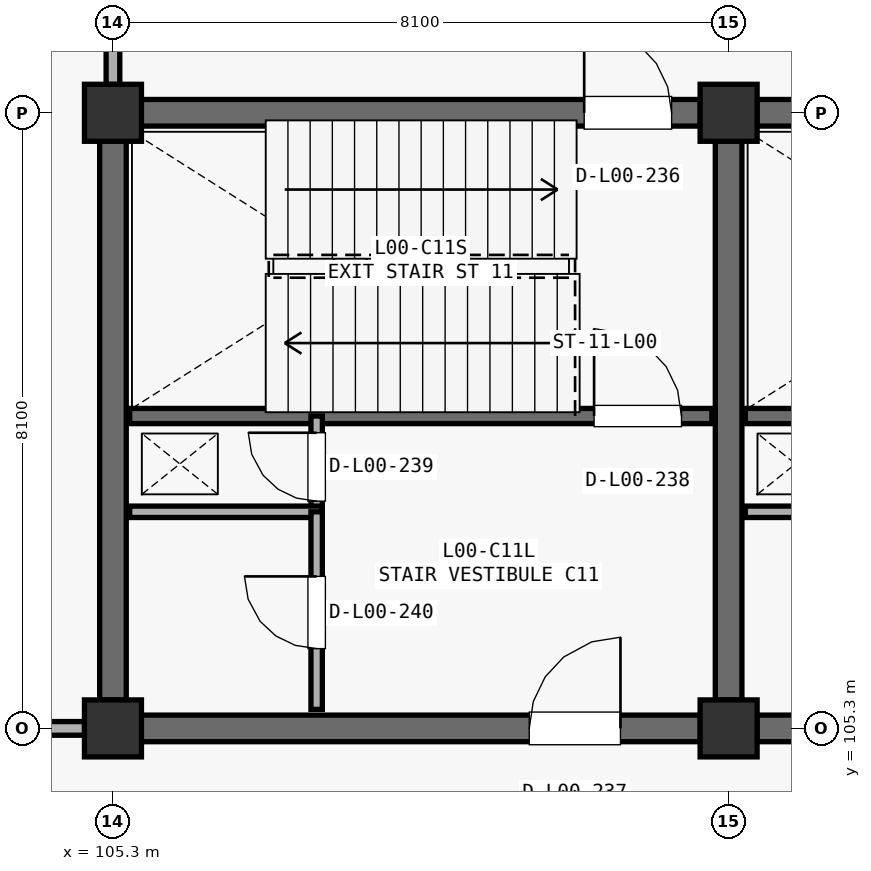
"""IFC4 building model, lengths in metres.
Left out: names, types, materials, properties, quantities, classifications, styles, units other than length and angle.
Written with IfcOpenShell. Run it as: python <this file> out.ifc"""

import sys

from ifc_helpers import new_model, si_unit, direction, frame, frame_2d, origin, origin_2d, place, context, subcontext, project, spatial, rectangle, extrude, element, fill, save


model = new_model("IFC4")
c1 = context("Model", 3, precision=1e-05, world=origin(), true_north=direction((0.0, 1.0)))
c2 = subcontext(c1, "Body", "Model", "MODEL_VIEW")
j1 = project(units=[si_unit("LENGTHUNIT", "METRE"), si_unit("PLANEANGLEUNIT", "RADIAN")], contexts=[c1])
p1 = place(None, origin())
s1 = spatial("IfcSite", under=j1, at=p1, CompositionType="ELEMENT")
p2 = place(p1, origin())
s2 = spatial("IfcBuilding", under=s1, at=p2, CompositionType="ELEMENT")
p3 = place(p2, origin())
s3 = spatial("IfcBuildingStorey", under=s2, at=p3, CompositionType="ELEMENT", Elevation=0.0)
for number, where, z_axis, x_axis in (
    (1, (105.3, 105.3, 0.0), (0.0, 0.0, 1.0), (1.0, 0.0, 0.0)),
    (2, (105.3, 113.4, 0.0), (0.0, 0.0, 1.0), (1.0, 0.0, 0.0)),
    (3, (113.4, 105.3, 0.0), (0.0, 0.0, 1.0), (1.0, 0.0, 0.0)),
    (4, (113.4, 113.4, 0.0), (0.0, 0.0, 1.0), (1.0, 0.0, 0.0)),
):
    element("IfcColumn", number, at=place(p3, frame(where, z_axis=z_axis, x_axis=x_axis)), inside=s3, PredefinedType="COLUMN", context=c2, shape_type="SweptSolid", body=[
        extrude(rectangle(XDim=0.75, YDim=0.75, at=origin_2d()), origin(), (0.0, 0.0, 1.0), 5.1),
    ])
p4 = place(p3, frame((113.773, 113.4, 0.0), z_axis=(0.0, 0.0, 1.0), x_axis=(1.0, 0.0, 0.0)))
e5 = element("IfcWall", 5, at=p4, inside=s3, PredefinedType="SHEAR", context=c2, shape_type="SweptSolid", body=[
    extrude(rectangle(XDim=7.354, YDim=0.35, at=frame_2d((3.677, 0.0))), origin(), (0.0, 0.0, 1.0), 4.822),
])
p5 = place(p4, frame((5.827, 0.0, 0.0)))
e6 = element("IfcOpeningElement", 6, at=p5, cuts=e5, PredefinedType="OPENING", context=c2, shape_type="SweptSolid", body=[
    extrude(rectangle(XDim=1.15, YDim=2.2, at=frame_2d((0.575, 1.1))), frame((0.0, 0.185, 0.0), z_axis=(0.0, -1.0, 0.0), x_axis=(1.0, 0.0, 0.0)), (0.0, 0.0, 1.0), 0.37),
])
p6 = place(p3, frame((113.4, 105.673, 0.0), z_axis=(0.0, 0.0, 1.0), x_axis=(0.0, 1.0, 0.0)))
e7 = element("IfcWall", 7, at=p6, inside=s3, PredefinedType="SHEAR", context=c2, shape_type="SweptSolid", body=[
    extrude(rectangle(XDim=7.354, YDim=0.35, at=frame_2d((3.677, 0.0))), origin(), (0.0, 0.0, 1.0), 4.822),
])
p7 = place(p3, frame((113.773, 105.3, 0.0), z_axis=(0.0, 0.0, 1.0), x_axis=(1.0, 0.0, 0.0)))
e8 = element("IfcWall", 8, at=p7, inside=s3, PredefinedType="SHEAR", context=c2, shape_type="SweptSolid", body=[
    extrude(rectangle(XDim=7.354, YDim=0.35, at=frame_2d((3.677, 0.0))), origin(), (0.0, 0.0, 1.0), 4.822),
])
p8 = place(p7, frame((5.104, 0.0, 0.0)))
e9 = element("IfcOpeningElement", 9, at=p8, cuts=e8, PredefinedType="OPENING", context=c2, shape_type="SweptSolid", body=[
    extrude(rectangle(XDim=1.2, YDim=2.2, at=frame_2d((0.6, 1.1))), frame((0.0, 0.185, 0.0), z_axis=(0.0, -1.0, 0.0), x_axis=(1.0, 0.0, 0.0)), (0.0, 0.0, 1.0), 0.37),
])
p9 = place(p3, frame((113.62, 109.41, 0.0), z_axis=(0.0, 0.0, 1.0), x_axis=(1.0, 0.0, 0.0)))
e10 = element("IfcWall", 10, at=p9, inside=s3, PredefinedType="SHEAR", context=c2, shape_type="SweptSolid", body=[
    extrude(rectangle(XDim=7.66, YDim=0.2, at=frame_2d((3.83, 0.0))), origin(), (0.0, 0.0, 1.0), 4.822),
])
p10 = place(p9, frame((6.11, 0.0, 0.0)))
e11 = element("IfcOpeningElement", 11, at=p10, cuts=e10, PredefinedType="OPENING", context=c2, shape_type="SweptSolid", body=[
    extrude(rectangle(XDim=1.15, YDim=2.2, at=frame_2d((0.575, 1.1))), frame((0.0, 0.11, 0.0), z_axis=(0.0, -1.0, 0.0), x_axis=(1.0, 0.0, 0.0)), (0.0, 0.0, 1.0), 0.22),
])
p11 = place(p3, frame((113.62, 108.15, 0.0), z_axis=(0.0, 0.0, 1.0), x_axis=(1.0, 0.0, 0.0)))
e12 = element("IfcWall", 12, at=p11, inside=s3, PredefinedType="PARTITIONING", context=c2, shape_type="SweptSolid", body=[
    extrude(rectangle(XDim=2.53, YDim=0.15, at=frame_2d((1.265, 0.0))), origin(), (0.0, 0.0, 1.0), 4.822),
])
p12 = place(p3, frame((105.673, 113.4, 0.0), z_axis=(0.0, 0.0, 1.0), x_axis=(1.0, 0.0, 0.0)))
e13 = element("IfcWall", 13, at=p12, inside=s3, PredefinedType="SHEAR", context=c2, shape_type="SweptSolid", body=[
    extrude(rectangle(XDim=7.354, YDim=0.35, at=frame_2d((3.677, 0.0))), origin(), (0.0, 0.0, 1.0), 4.822),
])
p13 = place(p12, frame((5.827, 0.0, 0.0)))
e14 = element("IfcOpeningElement", 14, at=p13, cuts=e13, PredefinedType="OPENING", context=c2, shape_type="SweptSolid", body=[
    extrude(rectangle(XDim=1.15, YDim=2.2, at=frame_2d((0.575, 1.1))), frame((0.0, 0.185, 0.0), z_axis=(0.0, -1.0, 0.0), x_axis=(1.0, 0.0, 0.0)), (0.0, 0.0, 1.0), 0.37),
])
p14 = place(p3, frame((105.3, 105.673, 0.0), z_axis=(0.0, 0.0, 1.0), x_axis=(0.0, 1.0, 0.0)))
e15 = element("IfcWall", 15, at=p14, inside=s3, PredefinedType="SHEAR", context=c2, shape_type="SweptSolid", body=[
    extrude(rectangle(XDim=7.354, YDim=0.35, at=frame_2d((3.677, 0.0))), origin(), (0.0, 0.0, 1.0), 4.822),
])
p15 = place(p3, frame((105.673, 105.3, 0.0), z_axis=(0.0, 0.0, 1.0), x_axis=(1.0, 0.0, 0.0)))
e16 = element("IfcWall", 16, at=p15, inside=s3, PredefinedType="SHEAR", context=c2, shape_type="SweptSolid", body=[
    extrude(rectangle(XDim=7.354, YDim=0.35, at=frame_2d((3.677, 0.0))), origin(), (0.0, 0.0, 1.0), 4.822),
])
p16 = place(p15, frame((5.104, 0.0, 0.0)))
e17 = element("IfcOpeningElement", 17, at=p16, cuts=e16, PredefinedType="OPENING", context=c2, shape_type="SweptSolid", body=[
    extrude(rectangle(XDim=1.2, YDim=2.2, at=frame_2d((0.6, 1.1))), frame((0.0, 0.185, 0.0), z_axis=(0.0, -1.0, 0.0), x_axis=(1.0, 0.0, 0.0)), (0.0, 0.0, 1.0), 0.37),
])
p17 = place(p3, frame((105.52, 109.41, 0.0), z_axis=(0.0, 0.0, 1.0), x_axis=(1.0, 0.0, 0.0)))
e18 = element("IfcWall", 18, at=p17, inside=s3, PredefinedType="SHEAR", context=c2, shape_type="SweptSolid", body=[
    extrude(rectangle(XDim=7.66, YDim=0.2, at=frame_2d((3.83, 0.0))), origin(), (0.0, 0.0, 1.0), 4.822),
])
p18 = place(p17, frame((6.11, 0.0, 0.0)))
e19 = element("IfcOpeningElement", 19, at=p18, cuts=e18, PredefinedType="OPENING", context=c2, shape_type="SweptSolid", body=[
    extrude(rectangle(XDim=1.15, YDim=2.2, at=frame_2d((0.575, 1.1))), frame((0.0, 0.11, 0.0), z_axis=(0.0, -1.0, 0.0), x_axis=(1.0, 0.0, 0.0)), (0.0, 0.0, 1.0), 0.22),
])
p19 = place(p3, frame((107.98, 108.15, 0.0), z_axis=(0.0, 0.0, 1.0), x_axis=(0.0, 1.0, 0.0)))
e20 = element("IfcWall", 20, at=p19, inside=s3, PredefinedType="PARTITIONING", context=c2, shape_type="SweptSolid", body=[
    extrude(rectangle(XDim=1.26, YDim=0.15, at=frame_2d((0.63, 0.0))), origin(), (0.0, 0.0, 1.0), 4.822),
])
p20 = place(p19, frame((0.14, 0.0, 0.0)))
e21 = element("IfcOpeningElement", 21, at=p20, cuts=e20, PredefinedType="OPENING", context=c2, shape_type="SweptSolid", body=[
    extrude(rectangle(XDim=0.9, YDim=2.15, at=frame_2d((0.45, 1.075))), frame((0.0, 0.085, 0.0), z_axis=(0.0, -1.0, 0.0), x_axis=(1.0, 0.0, 0.0)), (0.0, 0.0, 1.0), 0.17),
])
p21 = place(p3, frame((105.52, 108.15, 0.0), z_axis=(0.0, 0.0, 1.0), x_axis=(1.0, 0.0, 0.0)))
e22 = element("IfcWall", 22, at=p21, inside=s3, PredefinedType="PARTITIONING", context=c2, shape_type="SweptSolid", body=[
    extrude(rectangle(XDim=2.53, YDim=0.15, at=frame_2d((1.265, 0.0))), origin(), (0.0, 0.0, 1.0), 4.822),
])
p22 = place(p3, frame((107.98, 105.55, 0.0), z_axis=(0.0, 0.0, 1.0), x_axis=(0.0, 1.0, 0.0)))
e23 = element("IfcWall", 23, at=p22, inside=s3, PredefinedType="PARTITIONING", context=c2, shape_type="SweptSolid", body=[
    extrude(rectangle(XDim=2.6, YDim=0.15, at=frame_2d((1.3, 0.0))), origin(), (0.0, 0.0, 1.0), 4.822),
])
p23 = place(p22, frame((0.8, 0.0, 0.0)))
e24 = element("IfcOpeningElement", 24, at=p23, cuts=e23, PredefinedType="OPENING", context=c2, shape_type="SweptSolid", body=[
    extrude(rectangle(XDim=0.95, YDim=2.15, at=frame_2d((0.475, 1.075))), frame((0.0, 0.085, 0.0), z_axis=(0.0, -1.0, 0.0), x_axis=(1.0, 0.0, 0.0)), (0.0, 0.0, 1.0), 0.17),
])
for number, where, z_axis, x_axis in (
    (25, (97.573, 105.3, 0.0), (0.0, 0.0, 1.0), (1.0, 0.0, 0.0)),
    (26, (105.3, 113.773, 0.0), (0.0, 0.0, 1.0), (0.0, 1.0, 0.0)),
):
    element("IfcWall", number, at=place(p3, frame(where, z_axis=z_axis, x_axis=x_axis)), inside=s3, PredefinedType="PARTITIONING", context=c2, shape_type="SweptSolid", body=[
        extrude(rectangle(XDim=7.354, YDim=0.18, at=frame_2d((3.677, 0.0))), origin(), (0.0, 0.0, 1.0), 4.172),
    ])
p24 = place(p13, origin())
e27 = element("IfcDoor", 27, at=p24, inside=s3, OperationType="SINGLE_SWING_LEFT", PredefinedType="DOOR", context=c2, shape_type="SweptSolid", body=[
    extrude(rectangle(XDim=1.15, YDim=2.2, at=frame_2d((0.575, 1.1))), frame((0.0, 0.025, 0.0), z_axis=(0.0, -1.0, 0.0), x_axis=(1.0, 0.0, 0.0)), (0.0, 0.0, 1.0), 0.05),
])
fill(e14, e27)
p25 = place(p16, origin())
e28 = element("IfcDoor", 28, at=p25, inside=s3, OperationType="SINGLE_SWING_RIGHT", PredefinedType="DOOR", context=c2, shape_type="SweptSolid", body=[
    extrude(rectangle(XDim=1.2, YDim=2.2, at=frame_2d((0.6, 1.1))), frame((0.0, 0.025, 0.0), z_axis=(0.0, -1.0, 0.0), x_axis=(1.0, 0.0, 0.0)), (0.0, 0.0, 1.0), 0.05),
])
fill(e17, e28)
p26 = place(p18, origin())
e29 = element("IfcDoor", 29, at=p26, inside=s3, OperationType="SINGLE_SWING_LEFT", PredefinedType="DOOR", context=c2, shape_type="SweptSolid", body=[
    extrude(rectangle(XDim=1.15, YDim=2.2, at=frame_2d((0.575, 1.1))), frame((0.0, 0.025, 0.0), z_axis=(0.0, -1.0, 0.0), x_axis=(1.0, 0.0, 0.0)), (0.0, 0.0, 1.0), 0.05),
])
fill(e19, e29)
p27 = place(p20, origin())
e30 = element("IfcDoor", 30, at=p27, inside=s3, OperationType="SINGLE_SWING_RIGHT", PredefinedType="DOOR", context=c2, shape_type="SweptSolid", body=[
    extrude(rectangle(XDim=0.9, YDim=2.15, at=frame_2d((0.45, 1.075))), frame((0.0, 0.025, 0.0), z_axis=(0.0, -1.0, 0.0), x_axis=(1.0, 0.0, 0.0)), (0.0, 0.0, 1.0), 0.05),
])
fill(e21, e30)
p28 = place(p23, origin())
e31 = element("IfcDoor", 31, at=p28, inside=s3, OperationType="SINGLE_SWING_RIGHT", PredefinedType="DOOR", context=c2, shape_type="SweptSolid", body=[
    extrude(rectangle(XDim=0.95, YDim=2.15, at=frame_2d((0.475, 1.075))), frame((0.0, 0.025, 0.0), z_axis=(0.0, -1.0, 0.0), x_axis=(1.0, 0.0, 0.0)), (0.0, 0.0, 1.0), 0.05),
])
fill(e24, e31)
save(model, sys.argv[1])
